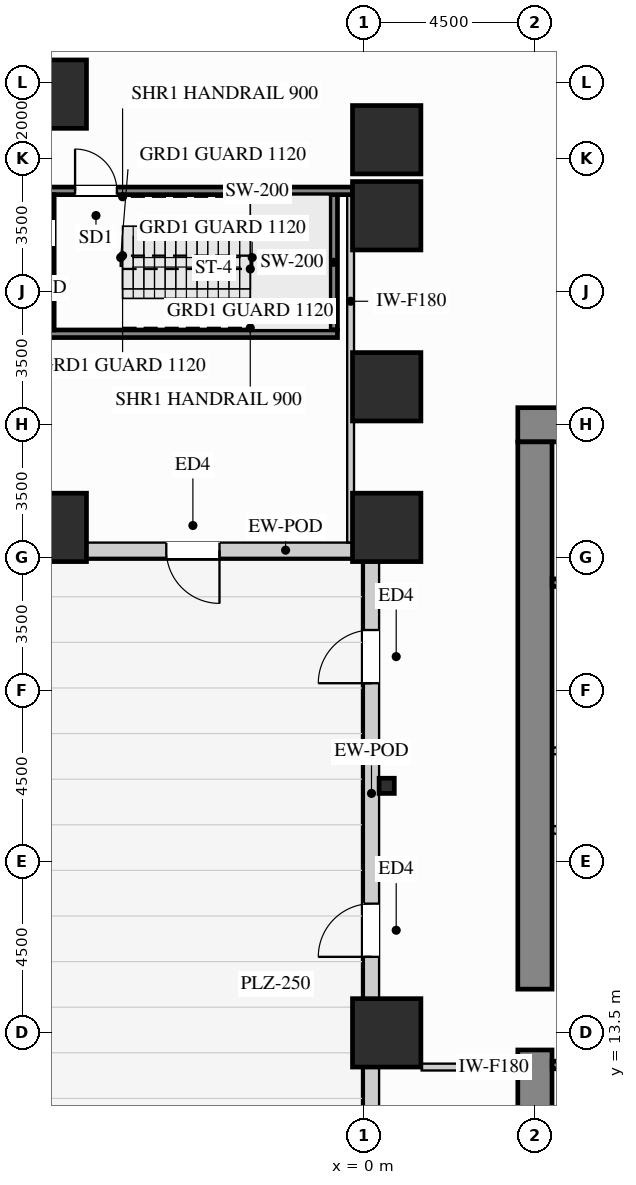
"""IFC4 building model, lengths in metres.
Left out: names, types, materials, properties, quantities, classifications, styles, units other than length and angle.
Written with IfcOpenShell. Run it as: python <this file> out.ifc"""

import sys

from ifc_helpers import new_model, si_unit, direction, frame, frame_2d, origin, origin_2d, place, context, subcontext, project, spatial, rectangle, hollow_rectangle, extrude, source, transform, mapped, element, fill, save


model = new_model("IFC4")
c1 = context("Model", 3, precision=1e-05, world=origin(), true_north=direction((0.0, 1.0)))
c2 = subcontext(c1, "Body", "Model", "MODEL_VIEW")
j1 = project(units=[si_unit("LENGTHUNIT", "METRE"), si_unit("PLANEANGLEUNIT", "RADIAN")], contexts=[c1])
p1 = place(None, origin())
s1 = spatial("IfcSite", under=j1, at=p1, CompositionType="ELEMENT")
p2 = place(p1, origin())
s2 = spatial("IfcBuilding", under=s1, at=p2, CompositionType="ELEMENT")
p3 = place(p2, origin())
s3 = spatial("IfcBuildingStorey", under=s2, at=p3, CompositionType="ELEMENT", Elevation=0.0)
m1 = source(origin(), c2, "Body", "SweptSolid", [
    extrude(rectangle(XDim=1.8, YDim=1.8, at=origin_2d()), origin(), (0.0, 0.0, 1.0), 4.25),
])
for number, where, z_axis, x_axis in (
    (1, (-8.2, 26.8, 0.0), (0.0, 0.0, 1.0), (1.0, 0.0, 0.0)),
    (2, (-8.2, 38.2, 0.0), (0.0, 0.0, 1.0), (1.0, 0.0, 0.0)),
    (3, (0.6, 13.5, 0.0), (0.0, 0.0, 1.0), (1.0, 0.0, 0.0)),
    (4, (0.6, 26.8, 0.0), (0.0, 0.0, 1.0), (1.0, 0.0, 0.0)),
    (5, (0.6, 30.5, 0.0), (0.0, 0.0, 1.0), (1.0, 0.0, 0.0)),
    (6, (0.6, 35.0, 0.0), (0.0, 0.0, 1.0), (1.0, 0.0, 0.0)),
    (7, (0.6, 37.0, 0.0), (0.0, 0.0, 1.0), (1.0, 0.0, 0.0)),
):
    element("IfcColumn", number, at=place(p3, frame(where, z_axis=z_axis, x_axis=x_axis)), inside=s3, PredefinedType="COLUMN", context=c2, shape_type="MappedRepresentation", body=[
        mapped(m1, transform((0.0, 0.0, 0.0), x_axis=(1.0, 0.0, 0.0), y_axis=(0.0, 1.0, 0.0), z_axis=(0.0, 0.0, 1.0))),
    ])
m2 = source(origin(), c2, "Body", "SweptSolid", [
    extrude(hollow_rectangle(XDim=0.4, YDim=0.4, WallThickness=0.02, at=origin_2d()), origin(), (0.0, 0.0, 1.0), 4.25),
])
p4 = place(p3, frame((0.6, 20.0, 0.0), z_axis=(0.0, 0.0, 1.0), x_axis=(1.0, 0.0, 0.0)))
e8 = element("IfcColumn", 8, at=p4, inside=s3, PredefinedType="PILASTER", context=c2, shape_type="MappedRepresentation", body=[
    mapped(m2, transform((0.0, 0.0, 0.0), x_axis=(1.0, 0.0, 0.0), y_axis=(0.0, 1.0, 0.0), z_axis=(0.0, 0.0, 1.0))),
])
m3 = source(origin(), c2, "Body", "SweptSolid", [
    extrude(rectangle(XDim=10.9, YDim=0.9, at=frame_2d((5.45, 0.0))), origin(), (0.0, 0.0, 1.0), 4.25),
])
p5 = place(p3, frame((4.05, 29.5, 0.0), z_axis=(0.0, 0.0, 1.0), x_axis=(1.0, 0.0, 0.0)))
e9 = element("IfcWall", 9, at=p5, inside=s3, PredefinedType="SHEAR", context=c2, shape_type="MappedRepresentation", body=[
    mapped(m3, transform((0.0, 0.0, 0.0), x_axis=(1.0, 0.0, 0.0), y_axis=(0.0, 1.0, 0.0), z_axis=(0.0, 0.0, 1.0))),
])
m4 = source(origin(), c2, "Body", "SweptSolid", [
    extrude(rectangle(XDim=4.1, YDim=0.9, at=frame_2d((2.05, 0.0))), origin(), (0.0, 0.0, 1.0), 4.25),
])
p6 = place(p3, frame((4.5, 8.95, 0.0), z_axis=(0.0, 0.0, 1.0), x_axis=(0.0, 1.0, 0.0)))
e10 = element("IfcWall", 10, at=p6, inside=s3, PredefinedType="SHEAR", context=c2, shape_type="MappedRepresentation", body=[
    mapped(m4, transform((0.0, 0.0, 0.0), x_axis=(1.0, 0.0, 0.0), y_axis=(0.0, 1.0, 0.0), z_axis=(0.0, 0.0, 1.0))),
])
m5 = source(origin(), c2, "Body", "SweptSolid", [
    extrude(rectangle(XDim=14.4, YDim=0.9, at=frame_2d((7.2, 0.0))), origin(), (0.0, 0.0, 1.0), 4.25),
])
p7 = place(p3, frame((4.5, 14.65, 0.0), z_axis=(0.0, 0.0, 1.0), x_axis=(0.0, 1.0, 0.0)))
e11 = element("IfcWall", 11, at=p7, inside=s3, PredefinedType="SHEAR", context=c2, shape_type="MappedRepresentation", body=[
    mapped(m5, transform((0.0, 0.0, 0.0), x_axis=(1.0, 0.0, 0.0), y_axis=(0.0, 1.0, 0.0), z_axis=(0.0, 0.0, 1.0))),
])
p8 = place(p3, frame((-7.302, 26.2, 0.0), z_axis=(0.0, 0.0, 1.0), x_axis=(1.0, 0.0, 0.0)))
e12 = element("IfcWall", 12, at=p8, inside=s3, PredefinedType="SOLIDWALL", context=c2, shape_type="SweptSolid", body=[
    extrude(rectangle(XDim=7.004, YDim=0.4, at=frame_2d((3.502, 0.0))), origin(), (0.0, 0.0, 1.0), 4.235),
])
p9 = place(p8, frame((2.102, 0.0, 0.0)))
e13 = element("IfcOpeningElement", 13, at=p9, cuts=e12, PredefinedType="OPENING", context=c2, shape_type="SweptSolid", body=[
    extrude(rectangle(XDim=1.4, YDim=2.2, at=frame_2d((0.7, 1.1))), frame((0.0, 0.21, 0.0), z_axis=(0.0, -1.0, 0.0), x_axis=(1.0, 0.0, 0.0)), (0.0, 0.0, 1.0), 0.42),
])
p10 = place(p3, frame((0.2, 25.902, 0.0), z_axis=(0.0, 0.0, 1.0), x_axis=(0.0, -1.0, 0.0)))
e14 = element("IfcWall", 14, at=p10, inside=s3, PredefinedType="SOLIDWALL", context=c2, shape_type="SweptSolid", body=[
    extrude(rectangle(XDim=11.504, YDim=0.4, at=frame_2d((5.752, 0.0))), origin(), (0.0, 0.0, 1.0), 3.135),
])
p11 = place(p10, frame((1.802, 0.0, 0.0)))
e15 = element("IfcOpeningElement", 15, at=p11, cuts=e14, PredefinedType="OPENING", context=c2, shape_type="SweptSolid", body=[
    extrude(rectangle(XDim=1.4, YDim=2.2, at=frame_2d((0.7, 1.1))), frame((0.0, 0.21, 0.0), z_axis=(0.0, -1.0, 0.0), x_axis=(1.0, 0.0, 0.0)), (0.0, 0.0, 1.0), 0.42),
])
p12 = place(p10, frame((9.002, 0.0, 0.0)))
e16 = element("IfcOpeningElement", 16, at=p12, cuts=e14, PredefinedType="OPENING", context=c2, shape_type="SweptSolid", body=[
    extrude(rectangle(XDim=1.4, YDim=2.2, at=frame_2d((0.7, 1.1))), frame((0.0, 0.21, 0.0), z_axis=(0.0, -1.0, 0.0), x_axis=(1.0, 0.0, 0.0)), (0.0, 0.0, 1.0), 0.42),
])
p13 = place(p3, frame((0.2, 12.602, 0.0), z_axis=(0.0, 0.0, 1.0), x_axis=(0.0, -1.0, 0.0)))
e17 = element("IfcWall", 17, at=p13, inside=s3, PredefinedType="SOLIDWALL", context=c2, shape_type="SweptSolid", body=[
    extrude(rectangle(XDim=11.104, YDim=0.4, at=frame_2d((5.552, 0.0))), origin(), (0.0, 0.0, 1.0), 3.135),
])
p14 = place(p13, frame((4.202, 0.0, 0.65)))
e18 = element("IfcOpeningElement", 18, at=p14, cuts=e17, PredefinedType="OPENING", context=c2, shape_type="SweptSolid", body=[
    extrude(rectangle(XDim=2.7, YDim=2.305, at=frame_2d((1.35, 1.152))), frame((0.0, 0.21, 0.0), z_axis=(0.0, -1.0, 0.0), x_axis=(1.0, 0.0, 0.0)), (0.0, 0.0, 1.0), 0.42),
])
m6 = source(origin(), c2, "Body", "SweptSolid", [
    extrude(rectangle(XDim=2.17, YDim=0.18, at=frame_2d((1.085, 0.0))), origin(), (0.0, 0.0, 1.0), 4.235),
])
p15 = place(p3, frame((4.98, 20.92, 0.0), z_axis=(0.0, 0.0, 1.0), x_axis=(1.0, 0.0, 0.0)))
e19 = element("IfcWall", 19, at=p15, inside=s3, PredefinedType="PARTITIONING", context=c2, shape_type="MappedRepresentation", body=[
    mapped(m6, transform((0.0, 0.0, 0.0), x_axis=(1.0, 0.0, 0.0), y_axis=(0.0, 1.0, 0.0), z_axis=(0.0, 0.0, 1.0))),
])
m7 = source(origin(), c2, "Body", "SweptSolid", [
    extrude(rectangle(XDim=9.198, YDim=0.18, at=frame_2d((4.599, 0.0))), origin(), (0.0, 0.0, 1.0), 4.235),
])
p16 = place(p3, frame((-0.35, 26.402, 0.0), z_axis=(0.0, 0.0, 1.0), x_axis=(0.0, 1.0, 0.0)))
e20 = element("IfcWall", 20, at=p16, inside=s3, PredefinedType="PARTITIONING", context=c2, shape_type="MappedRepresentation", body=[
    mapped(m7, transform((0.0, 0.0, 0.0), x_axis=(1.0, 0.0, 0.0), y_axis=(0.0, 1.0, 0.0), z_axis=(0.0, 0.0, 1.0))),
])
m8 = source(origin(), c2, "Body", "SweptSolid", [
    extrude(rectangle(XDim=2.5, YDim=0.18, at=frame_2d((1.25, 0.0))), origin(), (0.0, 0.0, 1.0), 4.235),
])
p17 = place(p3, frame((1.52, 12.6, 0.0), z_axis=(0.0, 0.0, 1.0), x_axis=(1.0, 0.0, 0.0)))
e21 = element("IfcWall", 21, at=p17, inside=s3, PredefinedType="PARTITIONING", context=c2, shape_type="MappedRepresentation", body=[
    mapped(m8, transform((0.0, 0.0, 0.0), x_axis=(1.0, 0.0, 0.0), y_axis=(0.0, 1.0, 0.0), z_axis=(0.0, 0.0, 1.0))),
])
m9 = source(origin(), c2, "Body", "SweptSolid", [
    extrude(rectangle(XDim=2.09, YDim=0.2, at=frame_2d((1.045, 0.0))), origin(), (0.0, 0.0, 1.0), 4.235),
])
p18 = place(p3, frame((4.98, 18.84, 0.0), z_axis=(0.0, 0.0, 1.0), x_axis=(1.0, 0.0, 0.0)))
e22 = element("IfcWall", 22, at=p18, inside=s3, PredefinedType="PARTITIONING", context=c2, shape_type="MappedRepresentation", body=[
    mapped(m9, transform((0.0, 0.0, 0.0), x_axis=(1.0, 0.0, 0.0), y_axis=(0.0, 1.0, 0.0), z_axis=(0.0, 0.0, 1.0))),
])
p19 = place(p3, frame((4.952, 12.655, 0.0), z_axis=(0.0, 0.0, 1.0), x_axis=(1.0, 0.0, 0.0)))
e23 = element("IfcWall", 23, at=p19, inside=s3, PredefinedType="SHEAR", context=c2, shape_type="SweptSolid", body=[
    extrude(rectangle(XDim=7.453, YDim=0.2, at=frame_2d((3.727, 0.0))), origin(), (0.0, 0.0, 1.0), 4.25),
])
p20 = place(p19, frame((0.4, 0.0, 0.0)))
e24 = element("IfcOpeningElement", 24, at=p20, cuts=e23, PredefinedType="OPENING", context=c2, shape_type="SweptSolid", body=[
    extrude(rectangle(XDim=1.1, YDim=2.15, at=frame_2d((0.55, 1.075))), frame((0.0, 0.11, 0.0), z_axis=(0.0, -1.0, 0.0), x_axis=(1.0, 0.0, 0.0)), (0.0, 0.0, 1.0), 0.22),
])
p21 = place(p3, frame((4.952, 25.345, 0.0), z_axis=(0.0, 0.0, 1.0), x_axis=(1.0, 0.0, 0.0)))
e25 = element("IfcWall", 25, at=p21, inside=s3, PredefinedType="SHEAR", context=c2, shape_type="SweptSolid", body=[
    extrude(rectangle(XDim=7.453, YDim=0.2, at=frame_2d((3.727, 0.0))), origin(), (0.0, 0.0, 1.0), 4.25),
])
p22 = place(p21, frame((0.4, 0.0, 0.0)))
e26 = element("IfcOpeningElement", 26, at=p22, cuts=e25, PredefinedType="OPENING", context=c2, shape_type="SweptSolid", body=[
    extrude(rectangle(XDim=1.1, YDim=2.15, at=frame_2d((0.55, 1.075))), frame((0.0, 0.11, 0.0), z_axis=(0.0, -1.0, 0.0), x_axis=(1.0, 0.0, 0.0)), (0.0, 0.0, 1.0), 0.22),
])
m10 = source(origin(), c2, "Body", "SweptSolid", [
    extrude(rectangle(XDim=3.56, YDim=0.2, at=frame_2d((1.78, 0.0))), origin(), (0.0, 0.0, 1.0), 4.25),
])
p23 = place(p3, frame((-0.795, 31.995, 0.0), z_axis=(0.0, 0.0, 1.0), x_axis=(0.0, 1.0, 0.0)))
e27 = element("IfcWall", 27, at=p23, inside=s3, PredefinedType="SHEAR", context=c2, shape_type="MappedRepresentation", body=[
    mapped(m10, transform((0.0, 0.0, 0.0), x_axis=(1.0, 0.0, 0.0), y_axis=(0.0, 1.0, 0.0), z_axis=(0.0, 0.0, 1.0))),
])
p24 = place(p3, frame((-8.35, 35.655, 0.0), z_axis=(0.0, 0.0, 1.0), x_axis=(1.0, 0.0, 0.0)))
e28 = element("IfcWall", 28, at=p24, inside=s3, PredefinedType="SHEAR", context=c2, shape_type="SweptSolid", body=[
    extrude(rectangle(XDim=8.05, YDim=0.2, at=frame_2d((4.025, 0.0))), origin(), (0.0, 0.0, 1.0), 4.25),
])
p25 = place(p24, frame((0.75, 0.0, 0.0)))
e29 = element("IfcOpeningElement", 29, at=p25, cuts=e28, PredefinedType="OPENING", context=c2, shape_type="SweptSolid", body=[
    extrude(rectangle(XDim=1.1, YDim=2.15, at=frame_2d((0.55, 1.075))), frame((0.0, 0.11, 0.0), z_axis=(0.0, -1.0, 0.0), x_axis=(1.0, 0.0, 0.0)), (0.0, 0.0, 1.0), 0.22),
])
m11 = source(origin(), c2, "Body", "SweptSolid", [
    extrude(rectangle(XDim=7.655, YDim=0.2, at=frame_2d((3.828, 0.0))), origin(), (0.0, 0.0, 1.0), 4.25),
])
p26 = place(p3, frame((-8.35, 31.895, 0.0), z_axis=(0.0, 0.0, 1.0), x_axis=(1.0, 0.0, 0.0)))
e30 = element("IfcWall", 30, at=p26, inside=s3, PredefinedType="SHEAR", context=c2, shape_type="MappedRepresentation", body=[
    mapped(m11, transform((0.0, 0.0, 0.0), x_axis=(1.0, 0.0, 0.0), y_axis=(0.0, 1.0, 0.0), z_axis=(0.0, 0.0, 1.0))),
])
p27 = place(p3, frame((-8.25, 31.995, 0.0), z_axis=(0.0, 0.0, 1.0), x_axis=(0.0, 1.0, 0.0)))
e31 = element("IfcWall", 31, at=p27, inside=s3, PredefinedType="SHEAR", context=c2, shape_type="MappedRepresentation", body=[
    mapped(m10, transform((0.0, 0.0, 0.0), x_axis=(1.0, 0.0, 0.0), y_axis=(0.0, 1.0, 0.0), z_axis=(0.0, 0.0, 1.0))),
])
m12 = source(origin(), c2, "Body", "SweptSolid", [
    extrude(rectangle(XDim=1.4, YDim=2.2, at=frame_2d((0.7, 1.1))), frame((0.0, 0.025, 0.0), z_axis=(0.0, -1.0, 0.0), x_axis=(1.0, 0.0, 0.0)), (0.0, 0.0, 1.0), 0.05),
])
p28 = place(p9, frame((1.4, 0.0, 0.0), z_axis=(0.0, 0.0, 1.0), x_axis=(-1.0, 0.0, 0.0)))
e32 = element("IfcDoor", 32, at=p28, inside=s3, OperationType="SINGLE_SWING_RIGHT", PredefinedType="DOOR", context=c2, shape_type="MappedRepresentation", body=[
    mapped(m12, transform((0.0, 0.0, 0.0), x_axis=(1.0, 0.0, 0.0), y_axis=(0.0, 1.0, 0.0), z_axis=(0.0, 0.0, 1.0))),
])
fill(e13, e32)
p29 = place(p11, frame((1.4, 0.0, 0.0), z_axis=(0.0, 0.0, 1.0), x_axis=(-1.0, 0.0, 0.0)))
e33 = element("IfcDoor", 33, at=p29, inside=s3, OperationType="SINGLE_SWING_RIGHT", PredefinedType="DOOR", context=c2, shape_type="MappedRepresentation", body=[
    mapped(m12, transform((0.0, 0.0, 0.0), x_axis=(1.0, 0.0, 0.0), y_axis=(0.0, 1.0, 0.0), z_axis=(0.0, 0.0, 1.0))),
])
fill(e15, e33)
p30 = place(p12, frame((1.4, 0.0, 0.0), z_axis=(0.0, 0.0, 1.0), x_axis=(-1.0, 0.0, 0.0)))
e34 = element("IfcDoor", 34, at=p30, inside=s3, OperationType="SINGLE_SWING_RIGHT", PredefinedType="DOOR", context=c2, shape_type="MappedRepresentation", body=[
    mapped(m12, transform((0.0, 0.0, 0.0), x_axis=(1.0, 0.0, 0.0), y_axis=(0.0, 1.0, 0.0), z_axis=(0.0, 0.0, 1.0))),
])
fill(e16, e34)
m13 = source(origin(), c2, "Body", "SweptSolid", [
    extrude(rectangle(XDim=1.1, YDim=2.15, at=frame_2d((0.55, 1.075))), frame((0.0, 0.025, 0.0), z_axis=(0.0, -1.0, 0.0), x_axis=(1.0, 0.0, 0.0)), (0.0, 0.0, 1.0), 0.05),
])
p31 = place(p25, origin())
e35 = element("IfcDoor", 35, at=p31, inside=s3, OperationType="SINGLE_SWING_LEFT", PredefinedType="DOOR", context=c2, shape_type="MappedRepresentation", body=[
    mapped(m13, transform((0.0, 0.0, 0.0), x_axis=(1.0, 0.0, 0.0), y_axis=(0.0, 1.0, 0.0), z_axis=(0.0, 0.0, 1.0))),
])
fill(e29, e35)
save(model, sys.argv[1])
